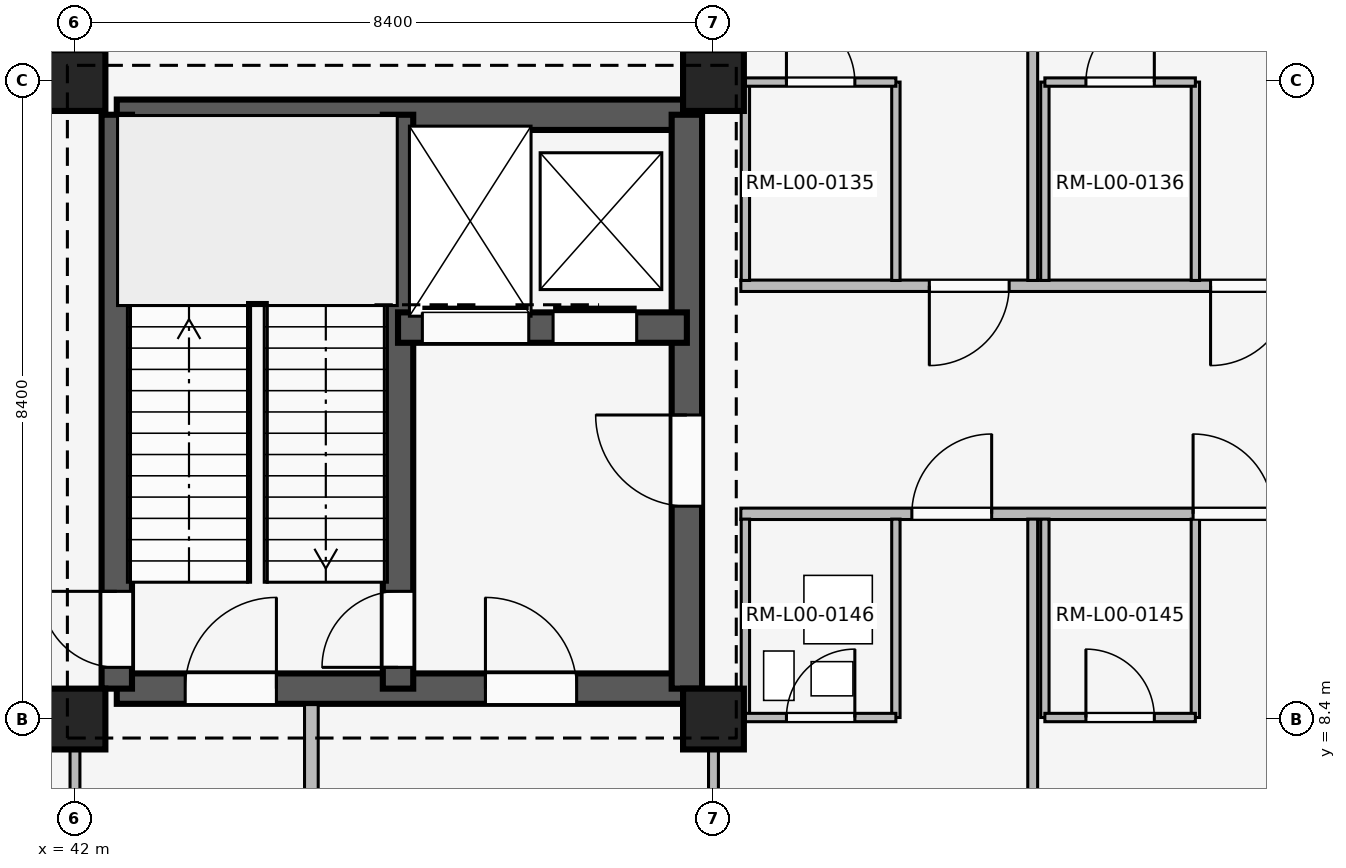
"""IFC4 building model, lengths in metres.
Left out: names, types, materials, properties, quantities, classifications, styles, units other than length and angle.
Written with IfcOpenShell. Run it as: python <this file> out.ifc"""

import sys

from ifc_helpers import new_model, si_unit, direction, frame, frame_2d, origin, origin_2d, place, context, subcontext, project, spatial, rectangle, extrude, element, fill, save


model = new_model("IFC4")
c1 = context("Model", 3, precision=1e-05, world=origin(), true_north=direction((0.0, 1.0)))
c2 = subcontext(c1, "Body", "Model", "MODEL_VIEW")
j1 = project(units=[si_unit("LENGTHUNIT", "METRE"), si_unit("PLANEANGLEUNIT", "RADIAN")], contexts=[c1])
p1 = place(None, origin())
s1 = spatial("IfcSite", under=j1, at=p1, CompositionType="ELEMENT")
p2 = place(p1, origin())
s2 = spatial("IfcBuilding", under=s1, at=p2, CompositionType="ELEMENT")
p3 = place(p2, origin())
s3 = spatial("IfcBuildingStorey", under=s2, at=p3, CompositionType="ELEMENT", Elevation=0.0)
for number, where, z_axis, x_axis in (
    (1, (42.0, 8.4, 0.0), (0.0, 0.0, 1.0), (1.0, 0.0, 0.0)),
    (2, (42.0, 16.8, 0.0), (0.0, 0.0, 1.0), (1.0, 0.0, 0.0)),
    (3, (50.4, 8.4, 0.0), (0.0, 0.0, 1.0), (1.0, 0.0, 0.0)),
    (4, (50.4, 16.8, 0.0), (0.0, 0.0, 1.0), (1.0, 0.0, 0.0)),
):
    element("IfcColumn", number, at=place(p3, frame(where, z_axis=z_axis, x_axis=x_axis)), inside=s3, PredefinedType="COLUMN", context=c2, shape_type="SweptSolid", body=[
        extrude(rectangle(XDim=0.8, YDim=0.8, at=origin_2d()), origin(), (0.0, 0.0, 1.0), 4.8),
    ])
p4 = place(p3, frame((42.55, 8.8, 0.0), z_axis=(0.0, 0.0, 1.0), x_axis=(1.0, 0.0, 0.0)))
e5 = element("IfcWall", 5, at=p4, inside=s3, PredefinedType="SHEAR", context=c2, shape_type="SweptSolid", body=[
    extrude(rectangle(XDim=7.5, YDim=0.4, at=frame_2d((3.75, 0.0))), origin(), (0.0, 0.0, 1.0), 4.52),
])
p5 = place(p4, frame((4.85, 0.0, 0.0)))
e6 = element("IfcOpeningElement", 6, at=p5, cuts=e5, PredefinedType="OPENING", context=c2, shape_type="SweptSolid", body=[
    extrude(rectangle(XDim=1.2, YDim=2.2, at=frame_2d((0.6, 1.1))), frame((0.0, 0.21, 0.0), z_axis=(0.0, -1.0, 0.0), x_axis=(1.0, 0.0, 0.0)), (0.0, 0.0, 1.0), 0.42),
])
p6 = place(p4, frame((0.9, 0.0, 0.0)))
e7 = element("IfcOpeningElement", 7, at=p6, cuts=e5, PredefinedType="OPENING", context=c2, shape_type="SweptSolid", body=[
    extrude(rectangle(XDim=1.2, YDim=2.2, at=frame_2d((0.6, 1.1))), frame((0.0, 0.21, 0.0), z_axis=(0.0, -1.0, 0.0), x_axis=(1.0, 0.0, 0.0)), (0.0, 0.0, 1.0), 0.42),
])
p7 = place(p3, frame((42.55, 16.35, 0.0), z_axis=(0.0, 0.0, 1.0), x_axis=(1.0, 0.0, 0.0)))
e8 = element("IfcWall", 8, at=p7, inside=s3, PredefinedType="SHEAR", context=c2, shape_type="SweptSolid", body=[
    extrude(rectangle(XDim=7.5, YDim=0.4, at=frame_2d((3.75, 0.0))), origin(), (0.0, 0.0, 1.0), 4.52),
])
p8 = place(p3, frame((42.55, 8.8, 0.0), z_axis=(0.0, 0.0, 1.0), x_axis=(0.0, 1.0, 0.0)))
e9 = element("IfcWall", 9, at=p8, inside=s3, PredefinedType="SHEAR", context=c2, shape_type="SweptSolid", body=[
    extrude(rectangle(XDim=7.55, YDim=0.4, at=frame_2d((3.775, 0.0))), origin(), (0.0, 0.0, 1.0), 4.52),
])
p9 = place(p8, frame((0.28, 0.0, 0.0)))
e10 = element("IfcOpeningElement", 10, at=p9, cuts=e9, PredefinedType="OPENING", context=c2, shape_type="SweptSolid", body=[
    extrude(rectangle(XDim=1.0, YDim=2.15, at=frame_2d((0.5, 1.075))), frame((0.0, 0.21, 0.0), z_axis=(0.0, -1.0, 0.0), x_axis=(1.0, 0.0, 0.0)), (0.0, 0.0, 1.0), 0.42),
])
p10 = place(p3, frame((50.05, 8.8, 0.0), z_axis=(0.0, 0.0, 1.0), x_axis=(0.0, 1.0, 0.0)))
e11 = element("IfcWall", 11, at=p10, inside=s3, PredefinedType="SHEAR", context=c2, shape_type="SweptSolid", body=[
    extrude(rectangle(XDim=7.55, YDim=0.4, at=frame_2d((3.775, 0.0))), origin(), (0.0, 0.0, 1.0), 4.52),
])
p11 = place(p10, frame((2.4, 0.0, 0.0)))
e12 = element("IfcOpeningElement", 12, at=p11, cuts=e11, PredefinedType="OPENING", context=c2, shape_type="SweptSolid", body=[
    extrude(rectangle(XDim=1.2, YDim=2.2, at=frame_2d((0.6, 1.1))), frame((0.0, 0.21, 0.0), z_axis=(0.0, -1.0, 0.0), x_axis=(1.0, 0.0, 0.0)), (0.0, 0.0, 1.0), 0.42),
])
p12 = place(p3, frame((46.25, 8.8, 0.0), z_axis=(0.0, 0.0, 1.0), x_axis=(0.0, 1.0, 0.0)))
e13 = element("IfcWall", 13, at=p12, inside=s3, PredefinedType="SHEAR", context=c2, shape_type="SweptSolid", body=[
    extrude(rectangle(XDim=7.55, YDim=0.4, at=frame_2d((3.775, 0.0))), origin(), (0.0, 0.0, 1.0), 4.52),
])
p13 = place(p12, frame((0.28, 0.0, 0.0)))
e14 = element("IfcOpeningElement", 14, at=p13, cuts=e13, PredefinedType="OPENING", context=c2, shape_type="SweptSolid", body=[
    extrude(rectangle(XDim=1.0, YDim=2.15, at=frame_2d((0.5, 1.075))), frame((0.0, 0.21, 0.0), z_axis=(0.0, -1.0, 0.0), x_axis=(1.0, 0.0, 0.0)), (0.0, 0.0, 1.0), 0.42),
])
p14 = place(p3, frame((46.25, 13.55, 0.0), z_axis=(0.0, 0.0, 1.0), x_axis=(1.0, 0.0, 0.0)))
e15 = element("IfcWall", 15, at=p14, inside=s3, PredefinedType="SHEAR", context=c2, shape_type="SweptSolid", body=[
    extrude(rectangle(XDim=3.8, YDim=0.4, at=frame_2d((1.9, 0.0))), origin(), (0.0, 0.0, 1.0), 4.52),
])
p15 = place(p14, frame((0.32, 0.0, 0.0)))
e16 = element("IfcOpeningElement", 16, at=p15, cuts=e15, PredefinedType="OPENING", context=c2, shape_type="SweptSolid", body=[
    extrude(rectangle(XDim=1.4, YDim=2.25, at=frame_2d((0.7, 1.125))), frame((0.0, 0.21, 0.0), z_axis=(0.0, -1.0, 0.0), x_axis=(1.0, 0.0, 0.0)), (0.0, 0.0, 1.0), 0.42),
])
p16 = place(p14, frame((2.04, 0.0, 0.0)))
e17 = element("IfcOpeningElement", 17, at=p16, cuts=e15, PredefinedType="OPENING", context=c2, shape_type="SweptSolid", body=[
    extrude(rectangle(XDim=1.1, YDim=2.15, at=frame_2d((0.55, 1.075))), frame((0.0, 0.21, 0.0), z_axis=(0.0, -1.0, 0.0), x_axis=(1.0, 0.0, 0.0)), (0.0, 0.0, 1.0), 0.42),
])
p17 = place(p3, frame((42.0, 0.14, 0.0), z_axis=(0.0, 0.0, 1.0), x_axis=(0.0, 1.0, 0.0)))
e18 = element("IfcWall", 18, at=p17, inside=s3, PredefinedType="PARTITIONING", context=c2, shape_type="SweptSolid", body=[
    extrude(rectangle(XDim=8.21, YDim=0.13, at=frame_2d((4.105, 0.0))), origin(), (0.0, 0.0, 1.0), 3.8),
])
p18 = place(p17, frame((3.64, 0.0, 0.0)))
e19 = element("IfcOpeningElement", 19, at=p18, cuts=e18, PredefinedType="OPENING", context=c2, shape_type="SweptSolid", body=[
    extrude(rectangle(XDim=1.08, YDim=2.15, at=frame_2d((0.54, 1.075))), frame((0.0, 0.075, 0.0), z_axis=(0.0, -1.0, 0.0), x_axis=(1.0, 0.0, 0.0)), (0.0, 0.0, 1.0), 0.15),
])
p19 = place(p3, frame((42.0, 17.15, 0.0), z_axis=(0.0, 0.0, 1.0), x_axis=(0.0, 1.0, 0.0)))
e20 = element("IfcWall", 20, at=p19, inside=s3, PredefinedType="PARTITIONING", context=c2, shape_type="SweptSolid", body=[
    extrude(rectangle(XDim=7.91, YDim=0.13, at=frame_2d((3.955, 0.0))), origin(), (0.0, 0.0, 1.0), 3.8),
])
p20 = place(p19, frame((3.4, 0.0, 0.0)))
e21 = element("IfcOpeningElement", 21, at=p20, cuts=e20, PredefinedType="OPENING", context=c2, shape_type="SweptSolid", body=[
    extrude(rectangle(XDim=1.05, YDim=2.2, at=frame_2d((0.525, 1.1))), frame((0.0, 0.075, 0.0), z_axis=(0.0, -1.0, 0.0), x_axis=(1.0, 0.0, 0.0)), (0.0, 0.0, 1.0), 0.15),
])
p21 = place(p3, frame((45.11, 0.14, 0.0), z_axis=(0.0, 0.0, 1.0), x_axis=(0.0, 1.0, 0.0)))
e22 = element("IfcWall", 22, at=p21, inside=s3, PredefinedType="PARTITIONING", context=c2, shape_type="SweptSolid", body=[
    extrude(rectangle(XDim=8.45, YDim=0.18, at=frame_2d((4.225, 0.0))), origin(), (0.0, 0.0, 1.0), 3.8),
])
p22 = place(p3, frame((50.4, 0.14, 0.0), z_axis=(0.0, 0.0, 1.0), x_axis=(0.0, 1.0, 0.0)))
e23 = element("IfcWall", 23, at=p22, inside=s3, PredefinedType="PARTITIONING", context=c2, shape_type="SweptSolid", body=[
    extrude(rectangle(XDim=8.21, YDim=0.13, at=frame_2d((4.105, 0.0))), origin(), (0.0, 0.0, 1.0), 3.8),
])
p23 = place(p22, frame((3.64, 0.0, 0.0)))
e24 = element("IfcOpeningElement", 24, at=p23, cuts=e23, PredefinedType="OPENING", context=c2, shape_type="SweptSolid", body=[
    extrude(rectangle(XDim=1.08, YDim=2.15, at=frame_2d((0.54, 1.075))), frame((0.0, 0.075, 0.0), z_axis=(0.0, -1.0, 0.0), x_axis=(1.0, 0.0, 0.0)), (0.0, 0.0, 1.0), 0.15),
])
p24 = place(p3, frame((50.4, 17.15, 0.0), z_axis=(0.0, 0.0, 1.0), x_axis=(0.0, 1.0, 0.0)))
e25 = element("IfcWall", 25, at=p24, inside=s3, PredefinedType="PARTITIONING", context=c2, shape_type="SweptSolid", body=[
    extrude(rectangle(XDim=7.91, YDim=0.13, at=frame_2d((3.955, 0.0))), origin(), (0.0, 0.0, 1.0), 3.8),
])
p25 = place(p24, frame((3.4, 0.0, 0.0)))
e26 = element("IfcOpeningElement", 26, at=p25, cuts=e25, PredefinedType="OPENING", context=c2, shape_type="SweptSolid", body=[
    extrude(rectangle(XDim=1.05, YDim=2.2, at=frame_2d((0.525, 1.1))), frame((0.0, 0.075, 0.0), z_axis=(0.0, -1.0, 0.0), x_axis=(1.0, 0.0, 0.0)), (0.0, 0.0, 1.0), 0.15),
])
p26 = place(p3, frame((50.76, 11.1, 0.0), z_axis=(0.0, 0.0, 1.0), x_axis=(1.0, 0.0, 0.0)))
e27 = element("IfcWall", 27, at=p26, inside=s3, PredefinedType="PARTITIONING", context=c2, shape_type="SweptSolid", body=[
    extrude(rectangle(XDim=7.96, YDim=0.15, at=frame_2d((3.98, 0.0))), origin(), (0.0, 0.0, 1.0), 3.8),
])
p27 = place(p26, frame((2.25, 0.0, 0.0)))
e28 = element("IfcOpeningElement", 28, at=p27, cuts=e27, PredefinedType="OPENING", context=c2, shape_type="SweptSolid", body=[
    extrude(rectangle(XDim=1.05, YDim=2.2, at=frame_2d((0.525, 1.1))), frame((0.0, 0.085, 0.0), z_axis=(0.0, -1.0, 0.0), x_axis=(1.0, 0.0, 0.0)), (0.0, 0.0, 1.0), 0.17),
])
p28 = place(p26, frame((5.95, 0.0, 0.0)))
e29 = element("IfcOpeningElement", 29, at=p28, cuts=e27, PredefinedType="OPENING", context=c2, shape_type="SweptSolid", body=[
    extrude(rectangle(XDim=1.05, YDim=2.2, at=frame_2d((0.525, 1.1))), frame((0.0, 0.085, 0.0), z_axis=(0.0, -1.0, 0.0), x_axis=(1.0, 0.0, 0.0)), (0.0, 0.0, 1.0), 0.17),
])
p29 = place(p3, frame((54.6, 0.1, 0.0), z_axis=(0.0, 0.0, 1.0), x_axis=(0.0, 1.0, 0.0)))
e30 = element("IfcWall", 30, at=p29, inside=s3, PredefinedType="PARTITIONING", context=c2, shape_type="SweptSolid", body=[
    extrude(rectangle(XDim=10.93, YDim=0.13, at=frame_2d((5.465, 0.0))), origin(), (0.0, 0.0, 1.0), 3.8),
])
for number, where, z_axis, x_axis in (
    (31, (50.82, 8.42, 0.0), (0.0, 0.0, 1.0), (0.0, 1.0, 0.0)),
    (32, (52.8, 8.42, 0.0), (0.0, 0.0, 1.0), (0.0, 1.0, 0.0)),
):
    element("IfcWall", number, at=place(p3, frame(where, z_axis=z_axis, x_axis=x_axis)), inside=s3, PredefinedType="PARTITIONING", context=c2, shape_type="SweptSolid", body=[
        extrude(rectangle(XDim=2.61, YDim=0.11, at=frame_2d((1.305, 0.0))), origin(), (0.0, 0.0, 1.0), 3.8),
    ])
p30 = place(p3, frame((50.82, 8.42, 0.0), z_axis=(0.0, 0.0, 1.0), x_axis=(1.0, 0.0, 0.0)))
e33 = element("IfcWall", 33, at=p30, inside=s3, PredefinedType="PARTITIONING", context=c2, shape_type="SweptSolid", body=[
    extrude(rectangle(XDim=1.98, YDim=0.11, at=frame_2d((0.99, 0.0))), origin(), (0.0, 0.0, 1.0), 3.8),
])
p31 = place(p30, frame((0.54, 0.0, 0.0)))
e34 = element("IfcOpeningElement", 34, at=p31, cuts=e33, PredefinedType="OPENING", context=c2, shape_type="SweptSolid", body=[
    extrude(rectangle(XDim=0.9, YDim=2.1, at=frame_2d((0.45, 1.05))), frame((0.0, 0.065, 0.0), z_axis=(0.0, -1.0, 0.0), x_axis=(1.0, 0.0, 0.0)), (0.0, 0.0, 1.0), 0.13),
])
for number, where, z_axis, x_axis in (
    (35, (54.76, 8.42, 0.0), (0.0, 0.0, 1.0), (0.0, 1.0, 0.0)),
    (36, (56.74, 8.42, 0.0), (0.0, 0.0, 1.0), (0.0, 1.0, 0.0)),
):
    element("IfcWall", number, at=place(p3, frame(where, z_axis=z_axis, x_axis=x_axis)), inside=s3, PredefinedType="PARTITIONING", context=c2, shape_type="SweptSolid", body=[
        extrude(rectangle(XDim=2.61, YDim=0.11, at=frame_2d((1.305, 0.0))), origin(), (0.0, 0.0, 1.0), 3.8),
    ])
p32 = place(p3, frame((54.76, 8.42, 0.0), z_axis=(0.0, 0.0, 1.0), x_axis=(1.0, 0.0, 0.0)))
e37 = element("IfcWall", 37, at=p32, inside=s3, PredefinedType="PARTITIONING", context=c2, shape_type="SweptSolid", body=[
    extrude(rectangle(XDim=1.98, YDim=0.11, at=frame_2d((0.99, 0.0))), origin(), (0.0, 0.0, 1.0), 3.8),
])
p33 = place(p32, frame((0.54, 0.0, 0.0)))
e38 = element("IfcOpeningElement", 38, at=p33, cuts=e37, PredefinedType="OPENING", context=c2, shape_type="SweptSolid", body=[
    extrude(rectangle(XDim=0.9, YDim=2.1, at=frame_2d((0.45, 1.05))), frame((0.0, 0.065, 0.0), z_axis=(0.0, -1.0, 0.0), x_axis=(1.0, 0.0, 0.0)), (0.0, 0.0, 1.0), 0.13),
])
p34 = place(p3, frame((58.72, 14.1, 0.0), z_axis=(0.0, 0.0, 1.0), x_axis=(-1.0, 0.0, 0.0)))
e39 = element("IfcWall", 39, at=p34, inside=s3, PredefinedType="PARTITIONING", context=c2, shape_type="SweptSolid", body=[
    extrude(rectangle(XDim=7.96, YDim=0.15, at=frame_2d((3.98, 0.0))), origin(), (0.0, 0.0, 1.0), 3.8),
])
p35 = place(p34, frame((0.73, 0.0, 0.0)))
e40 = element("IfcOpeningElement", 40, at=p35, cuts=e39, PredefinedType="OPENING", context=c2, shape_type="SweptSolid", body=[
    extrude(rectangle(XDim=1.05, YDim=2.2, at=frame_2d((0.525, 1.1))), frame((0.0, 0.085, 0.0), z_axis=(0.0, -1.0, 0.0), x_axis=(1.0, 0.0, 0.0)), (0.0, 0.0, 1.0), 0.17),
])
p36 = place(p34, frame((4.43, 0.0, 0.0)))
e41 = element("IfcOpeningElement", 41, at=p36, cuts=e39, PredefinedType="OPENING", context=c2, shape_type="SweptSolid", body=[
    extrude(rectangle(XDim=1.05, YDim=2.2, at=frame_2d((0.525, 1.1))), frame((0.0, 0.085, 0.0), z_axis=(0.0, -1.0, 0.0), x_axis=(1.0, 0.0, 0.0)), (0.0, 0.0, 1.0), 0.17),
])
p37 = place(p3, frame((54.6, 14.17, 0.0), z_axis=(0.0, 0.0, 1.0), x_axis=(0.0, 1.0, 0.0)))
e42 = element("IfcWall", 42, at=p37, inside=s3, PredefinedType="PARTITIONING", context=c2, shape_type="SweptSolid", body=[
    extrude(rectangle(XDim=10.93, YDim=0.13, at=frame_2d((5.465, 0.0))), origin(), (0.0, 0.0, 1.0), 3.8),
])
for number, where, z_axis, x_axis in (
    (43, (50.82, 14.17, 0.0), (0.0, 0.0, 1.0), (0.0, 1.0, 0.0)),
    (44, (52.8, 14.17, 0.0), (0.0, 0.0, 1.0), (0.0, 1.0, 0.0)),
):
    element("IfcWall", number, at=place(p3, frame(where, z_axis=z_axis, x_axis=x_axis)), inside=s3, PredefinedType="PARTITIONING", context=c2, shape_type="SweptSolid", body=[
        extrude(rectangle(XDim=2.61, YDim=0.11, at=frame_2d((1.305, 0.0))), origin(), (0.0, 0.0, 1.0), 3.8),
    ])
p38 = place(p3, frame((50.82, 16.78, 0.0), z_axis=(0.0, 0.0, 1.0), x_axis=(1.0, 0.0, 0.0)))
e45 = element("IfcWall", 45, at=p38, inside=s3, PredefinedType="PARTITIONING", context=c2, shape_type="SweptSolid", body=[
    extrude(rectangle(XDim=1.98, YDim=0.11, at=frame_2d((0.99, 0.0))), origin(), (0.0, 0.0, 1.0), 3.8),
])
p39 = place(p38, frame((0.54, 0.0, 0.0)))
e46 = element("IfcOpeningElement", 46, at=p39, cuts=e45, PredefinedType="OPENING", context=c2, shape_type="SweptSolid", body=[
    extrude(rectangle(XDim=0.9, YDim=2.1, at=frame_2d((0.45, 1.05))), frame((0.0, 0.065, 0.0), z_axis=(0.0, -1.0, 0.0), x_axis=(1.0, 0.0, 0.0)), (0.0, 0.0, 1.0), 0.13),
])
for number, where, z_axis, x_axis in (
    (47, (54.76, 14.17, 0.0), (0.0, 0.0, 1.0), (0.0, 1.0, 0.0)),
    (48, (56.74, 14.17, 0.0), (0.0, 0.0, 1.0), (0.0, 1.0, 0.0)),
):
    element("IfcWall", number, at=place(p3, frame(where, z_axis=z_axis, x_axis=x_axis)), inside=s3, PredefinedType="PARTITIONING", context=c2, shape_type="SweptSolid", body=[
        extrude(rectangle(XDim=2.61, YDim=0.11, at=frame_2d((1.305, 0.0))), origin(), (0.0, 0.0, 1.0), 3.8),
    ])
p40 = place(p3, frame((54.76, 16.78, 0.0), z_axis=(0.0, 0.0, 1.0), x_axis=(1.0, 0.0, 0.0)))
e49 = element("IfcWall", 49, at=p40, inside=s3, PredefinedType="PARTITIONING", context=c2, shape_type="SweptSolid", body=[
    extrude(rectangle(XDim=1.98, YDim=0.11, at=frame_2d((0.99, 0.0))), origin(), (0.0, 0.0, 1.0), 3.8),
])
p41 = place(p40, frame((0.54, 0.0, 0.0)))
e50 = element("IfcOpeningElement", 50, at=p41, cuts=e49, PredefinedType="OPENING", context=c2, shape_type="SweptSolid", body=[
    extrude(rectangle(XDim=0.9, YDim=2.1, at=frame_2d((0.45, 1.05))), frame((0.0, 0.065, 0.0), z_axis=(0.0, -1.0, 0.0), x_axis=(1.0, 0.0, 0.0)), (0.0, 0.0, 1.0), 0.13),
])
p42 = place(p11, origin())
e51 = element("IfcDoor", 51, at=p42, inside=s3, OperationType="SINGLE_SWING_RIGHT", PredefinedType="DOOR", context=c2, shape_type="SweptSolid", body=[
    extrude(rectangle(XDim=1.2, YDim=2.2, at=frame_2d((0.6, 1.1))), frame((0.0, 0.025, 0.0), z_axis=(0.0, -1.0, 0.0), x_axis=(1.0, 0.0, 0.0)), (0.0, 0.0, 1.0), 0.05),
])
fill(e12, e51)
p43 = place(p5, origin())
e52 = element("IfcDoor", 52, at=p43, inside=s3, OperationType="SINGLE_SWING_LEFT", PredefinedType="DOOR", context=c2, shape_type="SweptSolid", body=[
    extrude(rectangle(XDim=1.2, YDim=2.2, at=frame_2d((0.6, 1.1))), frame((0.0, 0.025, 0.0), z_axis=(0.0, -1.0, 0.0), x_axis=(1.0, 0.0, 0.0)), (0.0, 0.0, 1.0), 0.05),
])
fill(e6, e52)
p44 = place(p9, origin())
e53 = element("IfcDoor", 53, at=p44, inside=s3, OperationType="SINGLE_SWING_RIGHT", PredefinedType="DOOR", context=c2, shape_type="SweptSolid", body=[
    extrude(rectangle(XDim=1.0, YDim=2.15, at=frame_2d((0.5, 1.075))), frame((0.0, 0.025, 0.0), z_axis=(0.0, -1.0, 0.0), x_axis=(1.0, 0.0, 0.0)), (0.0, 0.0, 1.0), 0.05),
])
fill(e10, e53)
p45 = place(p13, origin())
e54 = element("IfcDoor", 54, at=p45, inside=s3, OperationType="SINGLE_SWING_LEFT", PredefinedType="DOOR", context=c2, shape_type="SweptSolid", body=[
    extrude(rectangle(XDim=1.0, YDim=2.15, at=frame_2d((0.5, 1.075))), frame((0.0, 0.025, 0.0), z_axis=(0.0, -1.0, 0.0), x_axis=(1.0, 0.0, 0.0)), (0.0, 0.0, 1.0), 0.05),
])
fill(e14, e54)
p46 = place(p6, origin())
e55 = element("IfcDoor", 55, at=p46, inside=s3, OperationType="SINGLE_SWING_RIGHT", PredefinedType="DOOR", context=c2, shape_type="SweptSolid", body=[
    extrude(rectangle(XDim=1.2, YDim=2.2, at=frame_2d((0.6, 1.1))), frame((0.0, 0.025, 0.0), z_axis=(0.0, -1.0, 0.0), x_axis=(1.0, 0.0, 0.0)), (0.0, 0.0, 1.0), 0.05),
])
fill(e7, e55)
p47 = place(p15, origin())
e56 = element("IfcDoor", 56, at=p47, inside=s3, OperationType="SLIDING_TO_LEFT", PredefinedType="DOOR", context=c2, shape_type="SweptSolid", body=[
    extrude(rectangle(XDim=1.4, YDim=2.25, at=frame_2d((0.7, 1.125))), frame((0.0, 0.025, 0.0), z_axis=(0.0, -1.0, 0.0), x_axis=(1.0, 0.0, 0.0)), (0.0, 0.0, 1.0), 0.05),
])
fill(e16, e56)
p48 = place(p16, origin())
e57 = element("IfcDoor", 57, at=p48, inside=s3, OperationType="SLIDING_TO_LEFT", PredefinedType="DOOR", context=c2, shape_type="SweptSolid", body=[
    extrude(rectangle(XDim=1.1, YDim=2.15, at=frame_2d((0.55, 1.075))), frame((0.0, 0.025, 0.0), z_axis=(0.0, -1.0, 0.0), x_axis=(1.0, 0.0, 0.0)), (0.0, 0.0, 1.0), 0.05),
])
fill(e17, e57)
p49 = place(p27, origin())
e58 = element("IfcDoor", 58, at=p49, inside=s3, OperationType="SINGLE_SWING_RIGHT", PredefinedType="DOOR", context=c2, shape_type="SweptSolid", body=[
    extrude(rectangle(XDim=1.05, YDim=2.2, at=frame_2d((0.525, 1.1))), frame((0.0, 0.025, 0.0), z_axis=(0.0, -1.0, 0.0), x_axis=(1.0, 0.0, 0.0)), (0.0, 0.0, 1.0), 0.05),
])
fill(e28, e58)
p50 = place(p28, origin())
e59 = element("IfcDoor", 59, at=p50, inside=s3, OperationType="SINGLE_SWING_LEFT", PredefinedType="DOOR", context=c2, shape_type="SweptSolid", body=[
    extrude(rectangle(XDim=1.05, YDim=2.2, at=frame_2d((0.525, 1.1))), frame((0.0, 0.025, 0.0), z_axis=(0.0, -1.0, 0.0), x_axis=(1.0, 0.0, 0.0)), (0.0, 0.0, 1.0), 0.05),
])
fill(e29, e59)
p51 = place(p31, origin())
e60 = element("IfcDoor", 60, at=p51, inside=s3, OperationType="SINGLE_SWING_RIGHT", PredefinedType="DOOR", context=c2, shape_type="SweptSolid", body=[
    extrude(rectangle(XDim=0.9, YDim=2.1, at=frame_2d((0.45, 1.05))), frame((0.0, 0.025, 0.0), z_axis=(0.0, -1.0, 0.0), x_axis=(1.0, 0.0, 0.0)), (0.0, 0.0, 1.0), 0.05),
])
fill(e34, e60)
p52 = place(p33, origin())
e61 = element("IfcDoor", 61, at=p52, inside=s3, OperationType="SINGLE_SWING_LEFT", PredefinedType="DOOR", context=c2, shape_type="SweptSolid", body=[
    extrude(rectangle(XDim=0.9, YDim=2.1, at=frame_2d((0.45, 1.05))), frame((0.0, 0.025, 0.0), z_axis=(0.0, -1.0, 0.0), x_axis=(1.0, 0.0, 0.0)), (0.0, 0.0, 1.0), 0.05),
])
fill(e38, e61)
p53 = place(p35, origin())
e62 = element("IfcDoor", 62, at=p53, inside=s3, OperationType="SINGLE_SWING_RIGHT", PredefinedType="DOOR", context=c2, shape_type="SweptSolid", body=[
    extrude(rectangle(XDim=1.05, YDim=2.2, at=frame_2d((0.525, 1.1))), frame((0.0, 0.025, 0.0), z_axis=(0.0, -1.0, 0.0), x_axis=(1.0, 0.0, 0.0)), (0.0, 0.0, 1.0), 0.05),
])
fill(e40, e62)
p54 = place(p36, origin())
e63 = element("IfcDoor", 63, at=p54, inside=s3, OperationType="SINGLE_SWING_RIGHT", PredefinedType="DOOR", context=c2, shape_type="SweptSolid", body=[
    extrude(rectangle(XDim=1.05, YDim=2.2, at=frame_2d((0.525, 1.1))), frame((0.0, 0.025, 0.0), z_axis=(0.0, -1.0, 0.0), x_axis=(1.0, 0.0, 0.0)), (0.0, 0.0, 1.0), 0.05),
])
fill(e41, e63)
p55 = place(p39, origin())
e64 = element("IfcDoor", 64, at=p55, inside=s3, OperationType="SINGLE_SWING_LEFT", PredefinedType="DOOR", context=c2, shape_type="SweptSolid", body=[
    extrude(rectangle(XDim=0.9, YDim=2.1, at=frame_2d((0.45, 1.05))), frame((0.0, 0.025, 0.0), z_axis=(0.0, -1.0, 0.0), x_axis=(1.0, 0.0, 0.0)), (0.0, 0.0, 1.0), 0.05),
])
fill(e46, e64)
p56 = place(p41, origin())
e65 = element("IfcDoor", 65, at=p56, inside=s3, OperationType="SINGLE_SWING_RIGHT", PredefinedType="DOOR", context=c2, shape_type="SweptSolid", body=[
    extrude(rectangle(XDim=0.9, YDim=2.1, at=frame_2d((0.45, 1.05))), frame((0.0, 0.025, 0.0), z_axis=(0.0, -1.0, 0.0), x_axis=(1.0, 0.0, 0.0)), (0.0, 0.0, 1.0), 0.05),
])
fill(e50, e65)
save(model, sys.argv[1])
